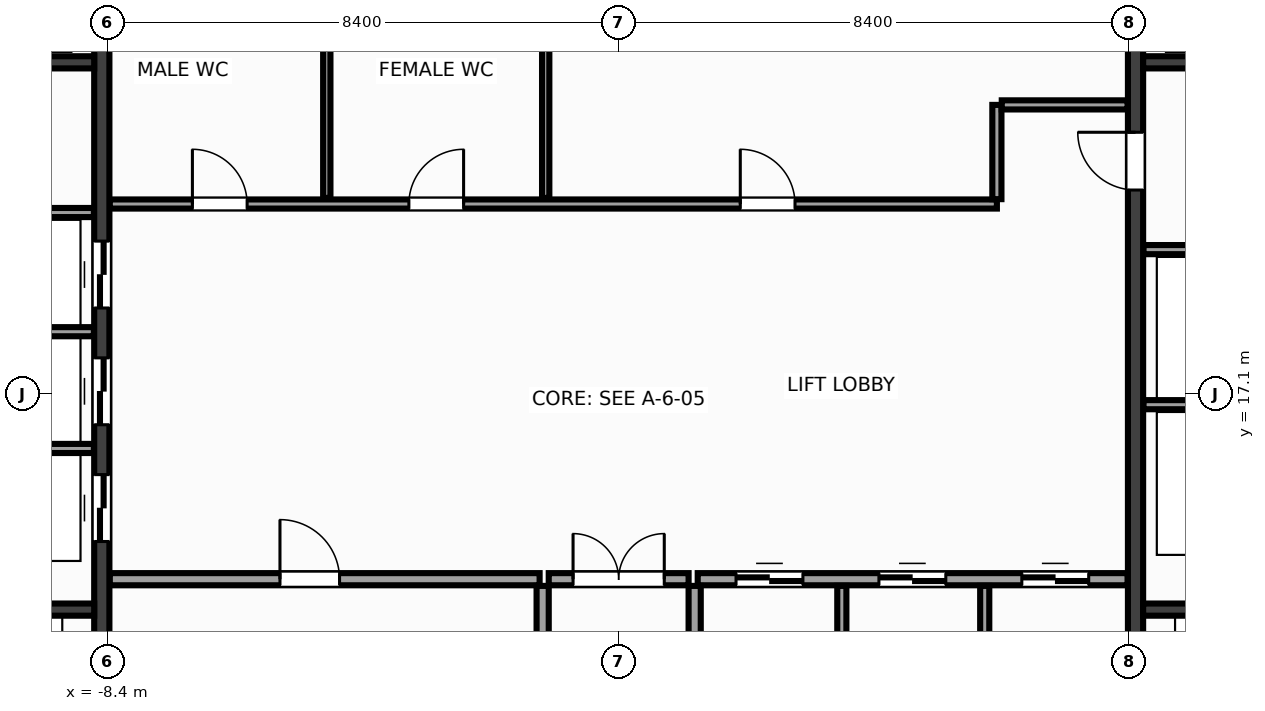
"""IFC4 building model, lengths in metres.
Left out: names, types, materials, properties, quantities, classifications, styles, units other than length and angle.
Written with IfcOpenShell. Run it as: python <this file> out.ifc"""

import sys

from ifc_helpers import new_model, si_unit, direction, frame, frame_2d, origin, place, context, subcontext, project, spatial, rectangle, extrude, source, transform, mapped, element, fill, save


model = new_model("IFC4")
c1 = context("Model", 3, precision=1e-05, world=origin(), true_north=direction((0.0, 1.0)))
c2 = subcontext(c1, "Body", "Model", "MODEL_VIEW")
j1 = project(units=[si_unit("LENGTHUNIT", "METRE"), si_unit("PLANEANGLEUNIT", "RADIAN")], contexts=[c1])
p1 = place(None, origin())
s1 = spatial("IfcSite", under=j1, at=p1, CompositionType="ELEMENT")
p2 = place(p1, origin())
s2 = spatial("IfcBuilding", under=s1, at=p2, CompositionType="ELEMENT")
p3 = place(p2, frame((0.0, 0.0, 153.2)))
s3 = spatial("IfcBuildingStorey", under=s2, at=p3, CompositionType="ELEMENT", Elevation=153.2)
m1 = source(origin(), c2, "Body", "SweptSolid", [
    extrude(rectangle(XDim=12.95, YDim=0.25, at=frame_2d((6.475, 0.0))), origin(), (0.0, 0.0, 1.0), 3.6),
])
p4 = place(p3, frame((-8.5, 10.525, 0.0), z_axis=(0.0, 0.0, 1.0), x_axis=(0.0, 1.0, 0.0)))
e1 = element("IfcWall", 1, at=p4, inside=s3, PredefinedType="SHEAR", context=c2, shape_type="MappedRepresentation", body=[
    mapped(m1, transform((0.0, 0.0, 0.0), x_axis=(1.0, 0.0, 0.0), y_axis=(0.0, 1.0, 0.0), z_axis=(0.0, 0.0, 1.0), scale=1.0)),
])
p5 = place(p4, frame((4.145, 0.0, 0.0)))
e2 = element("IfcOpeningElement", 2, at=p5, cuts=e1, PredefinedType="OPENING", context=c2, shape_type="SweptSolid", body=[
    extrude(rectangle(XDim=1.1, YDim=2.15, at=frame_2d((0.55, 1.075))), frame((0.0, 0.137, 0.0), z_axis=(0.0, -1.0, 0.0), x_axis=(1.0, 0.0, 0.0)), (0.0, 0.0, 1.0), 0.274),
])
p6 = place(p4, frame((6.065, 0.0, 0.0)))
e3 = element("IfcOpeningElement", 3, at=p6, cuts=e1, PredefinedType="OPENING", context=c2, shape_type="SweptSolid", body=[
    extrude(rectangle(XDim=1.1, YDim=2.15, at=frame_2d((0.55, 1.075))), frame((0.0, 0.137, 0.0), z_axis=(0.0, -1.0, 0.0), x_axis=(1.0, 0.0, 0.0)), (0.0, 0.0, 1.0), 0.274),
])
p7 = place(p4, frame((7.985, 0.0, 0.0)))
e4 = element("IfcOpeningElement", 4, at=p7, cuts=e1, PredefinedType="OPENING", context=c2, shape_type="SweptSolid", body=[
    extrude(rectangle(XDim=1.1, YDim=2.15, at=frame_2d((0.55, 1.075))), frame((0.0, 0.137, 0.0), z_axis=(0.0, -1.0, 0.0), x_axis=(1.0, 0.0, 0.0)), (0.0, 0.0, 1.0), 0.274),
])
p8 = place(p3, frame((8.5, 10.525, 0.0), z_axis=(0.0, 0.0, 1.0), x_axis=(0.0, 1.0, 0.0)))
e5 = element("IfcWall", 5, at=p8, inside=s3, PredefinedType="SHEAR", context=c2, shape_type="MappedRepresentation", body=[
    mapped(m1, transform((0.0, 0.0, 0.0), x_axis=(1.0, 0.0, 0.0), y_axis=(0.0, 1.0, 0.0), z_axis=(0.0, 0.0, 1.0), scale=1.0)),
])
p9 = place(p8, frame((9.925, 0.0, 0.0)))
e6 = element("IfcOpeningElement", 6, at=p9, cuts=e5, PredefinedType="OPENING", context=c2, shape_type="SweptSolid", body=[
    extrude(rectangle(XDim=0.95, YDim=2.15, at=frame_2d((0.475, 1.075))), frame((0.0, 0.137, 0.0), z_axis=(0.0, -1.0, 0.0), x_axis=(1.0, 0.0, 0.0)), (0.0, 0.0, 1.0), 0.274),
])
m2 = source(origin(), c2, "Body", "SweptSolid", [
    extrude(rectangle(XDim=2.825, YDim=0.2, at=frame_2d((1.413, 0.0))), origin(), (0.0, 0.0, 1.0), 3.6),
])
for number, where, z_axis, x_axis in (
    (7, (-11.45, 13.55, 0.0), (0.0, 0.0, 1.0), (1.0, 0.0, 0.0)),
    (8, (8.625, 13.55, 0.0), (0.0, 0.0, 1.0), (1.0, 0.0, 0.0)),
):
    element("IfcWall", number, at=place(p3, frame(where, z_axis=z_axis, x_axis=x_axis)), inside=s3, PredefinedType="SHEAR", context=c2, shape_type="MappedRepresentation", body=[
        mapped(m2, transform((0.0, 0.0, 0.0), x_axis=(1.0, 0.0, 0.0), y_axis=(0.0, 1.0, 0.0), z_axis=(0.0, 0.0, 1.0), scale=1.0)),
    ])
m3 = source(origin(), c2, "Body", "SweptSolid", [
    extrude(rectangle(XDim=3.02, YDim=0.2, at=frame_2d((1.51, 0.0))), origin(), (0.0, 0.0, 1.0), 3.6),
])
for number, where, z_axis, x_axis in (
    (9, (-11.645, 22.55, 0.0), (0.0, 0.0, 1.0), (1.0, 0.0, 0.0)),
    (10, (8.625, 22.55, 0.0), (0.0, 0.0, 1.0), (1.0, 0.0, 0.0)),
):
    element("IfcWall", number, at=place(p3, frame(where, z_axis=z_axis, x_axis=x_axis)), inside=s3, PredefinedType="SHEAR", context=c2, shape_type="MappedRepresentation", body=[
        mapped(m3, transform((0.0, 0.0, 0.0), x_axis=(1.0, 0.0, 0.0), y_axis=(0.0, 1.0, 0.0), z_axis=(0.0, 0.0, 1.0), scale=1.0)),
    ])
m4 = source(origin(), c2, "Body", "SweptSolid", [
    extrude(rectangle(XDim=3.01, YDim=0.15, at=frame_2d((1.505, 0.0))), origin(), (0.0, 0.0, 1.0), 3.38),
])
for number, where, z_axis, x_axis in (
    (11, (-11.64, 16.2, 0.0), (0.0, 0.0, 1.0), (1.0, 0.0, 0.0)),
    (12, (-11.64, 18.12, 0.0), (0.0, 0.0, 1.0), (1.0, 0.0, 0.0)),
    (13, (-11.64, 20.08, 0.0), (0.0, 0.0, 1.0), (1.0, 0.0, 0.0)),
    (14, (8.63, 16.92, 0.0), (0.0, 0.0, 1.0), (1.0, 0.0, 0.0)),
    (15, (8.63, 19.47, 0.0), (0.0, 0.0, 1.0), (1.0, 0.0, 0.0)),
):
    element("IfcWall", number, at=place(p3, frame(where, z_axis=z_axis, x_axis=x_axis)), inside=s3, PredefinedType="PARTITIONING", context=c2, shape_type="MappedRepresentation", body=[
        mapped(m4, transform((0.0, 0.0, 0.0), x_axis=(1.0, 0.0, 0.0), y_axis=(0.0, 1.0, 0.0), z_axis=(0.0, 0.0, 1.0), scale=1.0)),
    ])
m5 = source(origin(), c2, "Body", "SweptSolid", [
    extrude(rectangle(XDim=7.07, YDim=0.2, at=frame_2d((3.535, 0.0))), origin(), (0.0, 0.0, 1.0), 3.38),
])
p10 = place(p3, frame((-8.37, 14.05, 0.0), z_axis=(0.0, 0.0, 1.0), x_axis=(1.0, 0.0, 0.0)))
e16 = element("IfcWall", 16, at=p10, inside=s3, PredefinedType="PARTITIONING", context=c2, shape_type="MappedRepresentation", body=[
    mapped(m5, transform((0.0, 0.0, 0.0), x_axis=(1.0, 0.0, 0.0), y_axis=(0.0, 1.0, 0.0), z_axis=(0.0, 0.0, 1.0), scale=1.0)),
])
p11 = place(p10, frame((2.8, 0.0, 0.0)))
e17 = element("IfcOpeningElement", 17, at=p11, cuts=e16, PredefinedType="OPENING", context=c2, shape_type="SweptSolid", body=[
    extrude(rectangle(XDim=0.98, YDim=2.15, at=frame_2d((0.49, 1.075))), frame((0.0, 0.112, 0.0), z_axis=(0.0, -1.0, 0.0), x_axis=(1.0, 0.0, 0.0)), (0.0, 0.0, 1.0), 0.224),
])
p12 = place(p3, frame((1.3, 14.05, 0.0), z_axis=(0.0, 0.0, 1.0), x_axis=(1.0, 0.0, 0.0)))
e18 = element("IfcWall", 18, at=p12, inside=s3, PredefinedType="PARTITIONING", context=c2, shape_type="MappedRepresentation", body=[
    mapped(m5, transform((0.0, 0.0, 0.0), x_axis=(1.0, 0.0, 0.0), y_axis=(0.0, 1.0, 0.0), z_axis=(0.0, 0.0, 1.0), scale=1.0)),
])
p13 = place(p12, frame((0.63, 0.0, 0.0)))
e19 = element("IfcOpeningElement", 19, at=p13, cuts=e18, PredefinedType="OPENING", context=c2, shape_type="SweptSolid", body=[
    extrude(rectangle(XDim=1.1, YDim=2.15, at=frame_2d((0.55, 1.075))), frame((0.0, 0.112, 0.0), z_axis=(0.0, -1.0, 0.0), x_axis=(1.0, 0.0, 0.0)), (0.0, 0.0, 1.0), 0.224),
])
p14 = place(p12, frame((2.98, 0.0, 0.0)))
e20 = element("IfcOpeningElement", 20, at=p14, cuts=e18, PredefinedType="OPENING", context=c2, shape_type="SweptSolid", body=[
    extrude(rectangle(XDim=1.1, YDim=2.15, at=frame_2d((0.55, 1.075))), frame((0.0, 0.112, 0.0), z_axis=(0.0, -1.0, 0.0), x_axis=(1.0, 0.0, 0.0)), (0.0, 0.0, 1.0), 0.224),
])
p15 = place(p12, frame((5.33, 0.0, 0.0)))
e21 = element("IfcOpeningElement", 21, at=p15, cuts=e18, PredefinedType="OPENING", context=c2, shape_type="SweptSolid", body=[
    extrude(rectangle(XDim=1.1, YDim=2.15, at=frame_2d((0.55, 1.075))), frame((0.0, 0.112, 0.0), z_axis=(0.0, -1.0, 0.0), x_axis=(1.0, 0.0, 0.0)), (0.0, 0.0, 1.0), 0.224),
])
m6 = source(origin(), c2, "Body", "SweptSolid", [
    extrude(rectangle(XDim=3.415, YDim=0.2, at=frame_2d((1.708, 0.0))), origin(), (0.0, 0.0, 1.0), 3.38),
])
for number, where, z_axis, x_axis in (
    (22, (-1.25, 10.525, 0.0), (0.0, 0.0, 1.0), (0.0, 1.0, 0.0)),
    (23, (1.25, 10.525, 0.0), (0.0, 0.0, 1.0), (0.0, 1.0, 0.0)),
):
    element("IfcWall", number, at=place(p3, frame(where, z_axis=z_axis, x_axis=x_axis)), inside=s3, PredefinedType="PARTITIONING", context=c2, shape_type="MappedRepresentation", body=[
        mapped(m6, transform((0.0, 0.0, 0.0), x_axis=(1.0, 0.0, 0.0), y_axis=(0.0, 1.0, 0.0), z_axis=(0.0, 0.0, 1.0), scale=1.0)),
    ])
m7 = source(origin(), c2, "Body", "SweptSolid", [
    extrude(rectangle(XDim=2.3, YDim=0.2, at=frame_2d((1.15, 0.0))), origin(), (0.0, 0.0, 1.0), 3.38),
])
p16 = place(p3, frame((-1.15, 14.05, 0.0), z_axis=(0.0, 0.0, 1.0), x_axis=(1.0, 0.0, 0.0)))
e24 = element("IfcWall", 24, at=p16, inside=s3, PredefinedType="PARTITIONING", context=c2, shape_type="MappedRepresentation", body=[
    mapped(m7, transform((0.0, 0.0, 0.0), x_axis=(1.0, 0.0, 0.0), y_axis=(0.0, 1.0, 0.0), z_axis=(0.0, 0.0, 1.0), scale=1.0)),
])
p17 = place(p16, frame((0.4, 0.0, 0.0)))
e25 = element("IfcOpeningElement", 25, at=p17, cuts=e24, PredefinedType="OPENING", context=c2, shape_type="SweptSolid", body=[
    extrude(rectangle(XDim=1.5, YDim=2.2, at=frame_2d((0.75, 1.1))), frame((0.0, 0.112, 0.0), z_axis=(0.0, -1.0, 0.0), x_axis=(1.0, 0.0, 0.0)), (0.0, 0.0, 1.0), 0.224),
])
m8 = source(origin(), c2, "Body", "SweptSolid", [
    extrude(rectangle(XDim=14.59, YDim=0.15, at=frame_2d((7.295, 0.0))), origin(), (0.0, 0.0, 1.0), 3.38),
])
p18 = place(p3, frame((-8.37, 20.22, 0.0), z_axis=(0.0, 0.0, 1.0), x_axis=(1.0, 0.0, 0.0)))
e26 = element("IfcWall", 26, at=p18, inside=s3, PredefinedType="PARTITIONING", context=c2, shape_type="MappedRepresentation", body=[
    mapped(m8, transform((0.0, 0.0, 0.0), x_axis=(1.0, 0.0, 0.0), y_axis=(0.0, 1.0, 0.0), z_axis=(0.0, 0.0, 1.0), scale=1.0)),
])
p19 = place(p18, frame((1.36, 0.0, 0.0)))
e27 = element("IfcOpeningElement", 27, at=p19, cuts=e26, PredefinedType="OPENING", context=c2, shape_type="SweptSolid", body=[
    extrude(rectangle(XDim=0.9, YDim=2.15, at=frame_2d((0.45, 1.075))), frame((0.0, 0.087, 0.0), z_axis=(0.0, -1.0, 0.0), x_axis=(1.0, 0.0, 0.0)), (0.0, 0.0, 1.0), 0.174),
])
p20 = place(p18, frame((4.92, 0.0, 0.0)))
e28 = element("IfcOpeningElement", 28, at=p20, cuts=e26, PredefinedType="OPENING", context=c2, shape_type="SweptSolid", body=[
    extrude(rectangle(XDim=0.9, YDim=2.15, at=frame_2d((0.45, 1.075))), frame((0.0, 0.087, 0.0), z_axis=(0.0, -1.0, 0.0), x_axis=(1.0, 0.0, 0.0)), (0.0, 0.0, 1.0), 0.174),
])
p21 = place(p18, frame((10.37, 0.0, 0.0)))
e29 = element("IfcOpeningElement", 29, at=p21, cuts=e26, PredefinedType="OPENING", context=c2, shape_type="SweptSolid", body=[
    extrude(rectangle(XDim=0.9, YDim=2.15, at=frame_2d((0.45, 1.075))), frame((0.0, 0.087, 0.0), z_axis=(0.0, -1.0, 0.0), x_axis=(1.0, 0.0, 0.0)), (0.0, 0.0, 1.0), 0.174),
])
m9 = source(origin(), c2, "Body", "SweptSolid", [
    extrude(rectangle(XDim=1.55, YDim=0.15, at=frame_2d((0.775, 0.0))), origin(), (0.0, 0.0, 1.0), 3.38),
])
p22 = place(p3, frame((6.22, 20.3, 0.0), z_axis=(0.0, 0.0, 1.0), x_axis=(0.0, 1.0, 0.0)))
e30 = element("IfcWall", 30, at=p22, inside=s3, PredefinedType="PARTITIONING", context=c2, shape_type="MappedRepresentation", body=[
    mapped(m9, transform((0.0, 0.0, 0.0), x_axis=(1.0, 0.0, 0.0), y_axis=(0.0, 1.0, 0.0), z_axis=(0.0, 0.0, 1.0), scale=1.0)),
])
m10 = source(origin(), c2, "Body", "SweptSolid", [
    extrude(rectangle(XDim=2.07, YDim=0.15, at=frame_2d((1.035, 0.0))), origin(), (0.0, 0.0, 1.0), 3.38),
])
p23 = place(p3, frame((6.3, 21.85, 0.0), z_axis=(0.0, 0.0, 1.0), x_axis=(1.0, 0.0, 0.0)))
e31 = element("IfcWall", 31, at=p23, inside=s3, PredefinedType="PARTITIONING", context=c2, shape_type="MappedRepresentation", body=[
    mapped(m10, transform((0.0, 0.0, 0.0), x_axis=(1.0, 0.0, 0.0), y_axis=(0.0, 1.0, 0.0), z_axis=(0.0, 0.0, 1.0), scale=1.0)),
])
m11 = source(origin(), c2, "Body", "SweptSolid", [
    extrude(rectangle(XDim=3.415, YDim=0.15, at=frame_2d((1.708, 0.0))), origin(), (0.0, 0.0, 1.0), 3.38),
])
for number, where, z_axis, x_axis in (
    (32, (3.67, 10.525, 0.0), (0.0, 0.0, 1.0), (0.0, 1.0, 0.0)),
    (33, (6.02, 10.525, 0.0), (0.0, 0.0, 1.0), (0.0, 1.0, 0.0)),
):
    element("IfcWall", number, at=place(p3, frame(where, z_axis=z_axis, x_axis=x_axis)), inside=s3, PredefinedType="PARTITIONING", context=c2, shape_type="MappedRepresentation", body=[
        mapped(m11, transform((0.0, 0.0, 0.0), x_axis=(1.0, 0.0, 0.0), y_axis=(0.0, 1.0, 0.0), z_axis=(0.0, 0.0, 1.0), scale=1.0)),
    ])
m12 = source(origin(), c2, "Body", "SweptSolid", [
    extrude(rectangle(XDim=3.115, YDim=0.12, at=frame_2d((1.558, 0.0))), origin(), (0.0, 0.0, 1.0), 3.38),
])
for number, where, z_axis, x_axis in (
    (34, (-4.8, 20.32, 0.0), (0.0, 0.0, 1.0), (0.0, 1.0, 0.0)),
    (35, (-1.2, 20.32, 0.0), (0.0, 0.0, 1.0), (0.0, 1.0, 0.0)),
):
    element("IfcWall", number, at=place(p3, frame(where, z_axis=z_axis, x_axis=x_axis)), inside=s3, PredefinedType="PARTITIONING", context=c2, shape_type="MappedRepresentation", body=[
        mapped(m12, transform((0.0, 0.0, 0.0), x_axis=(1.0, 0.0, 0.0), y_axis=(0.0, 1.0, 0.0), z_axis=(0.0, 0.0, 1.0), scale=1.0)),
    ])
m13 = source(origin(), c2, "Body", "SweptSolid", [
    extrude(rectangle(XDim=1.1, YDim=2.15, at=frame_2d((0.55, 1.075))), frame((0.0, 0.025, 0.0), z_axis=(0.0, -1.0, 0.0), x_axis=(1.0, 0.0, 0.0)), (0.0, 0.0, 1.0), 0.05),
])
p24 = place(p5, origin())
e36 = element("IfcDoor", 36, at=p24, inside=s3, OperationType="DOUBLE_DOOR_SLIDING", PredefinedType="DOOR", context=c2, shape_type="MappedRepresentation", body=[
    mapped(m13, transform((0.0, 0.0, 0.0), x_axis=(1.0, 0.0, 0.0), y_axis=(0.0, 1.0, 0.0), z_axis=(0.0, 0.0, 1.0), scale=1.0)),
])
fill(e2, e36)
p25 = place(p6, origin())
e37 = element("IfcDoor", 37, at=p25, inside=s3, OperationType="DOUBLE_DOOR_SLIDING", PredefinedType="DOOR", context=c2, shape_type="MappedRepresentation", body=[
    mapped(m13, transform((0.0, 0.0, 0.0), x_axis=(1.0, 0.0, 0.0), y_axis=(0.0, 1.0, 0.0), z_axis=(0.0, 0.0, 1.0), scale=1.0)),
])
fill(e3, e37)
p26 = place(p7, origin())
e38 = element("IfcDoor", 38, at=p26, inside=s3, OperationType="DOUBLE_DOOR_SLIDING", PredefinedType="DOOR", context=c2, shape_type="MappedRepresentation", body=[
    mapped(m13, transform((0.0, 0.0, 0.0), x_axis=(1.0, 0.0, 0.0), y_axis=(0.0, 1.0, 0.0), z_axis=(0.0, 0.0, 1.0), scale=1.0)),
])
fill(e4, e38)
m14 = source(origin(), c2, "Body", "SweptSolid", [
    extrude(rectangle(XDim=0.95, YDim=2.15, at=frame_2d((0.475, 1.075))), frame((0.0, 0.025, 0.0), z_axis=(0.0, -1.0, 0.0), x_axis=(1.0, 0.0, 0.0)), (0.0, 0.0, 1.0), 0.05),
])
p27 = place(p9, origin())
e39 = element("IfcDoor", 39, at=p27, inside=s3, OperationType="SINGLE_SWING_RIGHT", PredefinedType="DOOR", context=c2, shape_type="MappedRepresentation", body=[
    mapped(m14, transform((0.0, 0.0, 0.0), x_axis=(1.0, 0.0, 0.0), y_axis=(0.0, 1.0, 0.0), z_axis=(0.0, 0.0, 1.0), scale=1.0)),
])
fill(e6, e39)
m15 = source(origin(), c2, "Body", "SweptSolid", [
    extrude(rectangle(XDim=0.98, YDim=2.15, at=frame_2d((0.49, 1.075))), frame((0.0, 0.025, 0.0), z_axis=(0.0, -1.0, 0.0), x_axis=(1.0, 0.0, 0.0)), (0.0, 0.0, 1.0), 0.05),
])
p28 = place(p11, origin())
e40 = element("IfcDoor", 40, at=p28, inside=s3, OperationType="SINGLE_SWING_LEFT", PredefinedType="DOOR", context=c2, shape_type="MappedRepresentation", body=[
    mapped(m15, transform((0.0, 0.0, 0.0), x_axis=(1.0, 0.0, 0.0), y_axis=(0.0, 1.0, 0.0), z_axis=(0.0, 0.0, 1.0), scale=1.0)),
])
fill(e17, e40)
p29 = place(p13, origin())
e41 = element("IfcDoor", 41, at=p29, inside=s3, OperationType="DOUBLE_DOOR_SLIDING", PredefinedType="DOOR", context=c2, shape_type="MappedRepresentation", body=[
    mapped(m13, transform((0.0, 0.0, 0.0), x_axis=(1.0, 0.0, 0.0), y_axis=(0.0, 1.0, 0.0), z_axis=(0.0, 0.0, 1.0), scale=1.0)),
])
fill(e19, e41)
p30 = place(p14, origin())
e42 = element("IfcDoor", 42, at=p30, inside=s3, OperationType="DOUBLE_DOOR_SLIDING", PredefinedType="DOOR", context=c2, shape_type="MappedRepresentation", body=[
    mapped(m13, transform((0.0, 0.0, 0.0), x_axis=(1.0, 0.0, 0.0), y_axis=(0.0, 1.0, 0.0), z_axis=(0.0, 0.0, 1.0), scale=1.0)),
])
fill(e20, e42)
p31 = place(p15, origin())
e43 = element("IfcDoor", 43, at=p31, inside=s3, OperationType="DOUBLE_DOOR_SLIDING", PredefinedType="DOOR", context=c2, shape_type="MappedRepresentation", body=[
    mapped(m13, transform((0.0, 0.0, 0.0), x_axis=(1.0, 0.0, 0.0), y_axis=(0.0, 1.0, 0.0), z_axis=(0.0, 0.0, 1.0), scale=1.0)),
])
fill(e21, e43)
m16 = source(origin(), c2, "Body", "SweptSolid", [
    extrude(rectangle(XDim=1.5, YDim=2.2, at=frame_2d((0.75, 1.1))), frame((0.0, 0.025, 0.0), z_axis=(0.0, -1.0, 0.0), x_axis=(1.0, 0.0, 0.0)), (0.0, 0.0, 1.0), 0.05),
])
p32 = place(p17, origin())
e44 = element("IfcDoor", 44, at=p32, inside=s3, OperationType="DOUBLE_DOOR_SINGLE_SWING", PredefinedType="DOOR", context=c2, shape_type="MappedRepresentation", body=[
    mapped(m16, transform((0.0, 0.0, 0.0), x_axis=(1.0, 0.0, 0.0), y_axis=(0.0, 1.0, 0.0), z_axis=(0.0, 0.0, 1.0), scale=1.0)),
])
fill(e25, e44)
m17 = source(origin(), c2, "Body", "SweptSolid", [
    extrude(rectangle(XDim=0.9, YDim=2.15, at=frame_2d((0.45, 1.075))), frame((0.0, 0.025, 0.0), z_axis=(0.0, -1.0, 0.0), x_axis=(1.0, 0.0, 0.0)), (0.0, 0.0, 1.0), 0.05),
])
p33 = place(p19, origin())
e45 = element("IfcDoor", 45, at=p33, inside=s3, OperationType="SINGLE_SWING_LEFT", PredefinedType="DOOR", context=c2, shape_type="MappedRepresentation", body=[
    mapped(m17, transform((0.0, 0.0, 0.0), x_axis=(1.0, 0.0, 0.0), y_axis=(0.0, 1.0, 0.0), z_axis=(0.0, 0.0, 1.0), scale=1.0)),
])
fill(e27, e45)
p34 = place(p20, origin())
e46 = element("IfcDoor", 46, at=p34, inside=s3, OperationType="SINGLE_SWING_RIGHT", PredefinedType="DOOR", context=c2, shape_type="MappedRepresentation", body=[
    mapped(m17, transform((0.0, 0.0, 0.0), x_axis=(1.0, 0.0, 0.0), y_axis=(0.0, 1.0, 0.0), z_axis=(0.0, 0.0, 1.0), scale=1.0)),
])
fill(e28, e46)
p35 = place(p21, origin())
e47 = element("IfcDoor", 47, at=p35, inside=s3, OperationType="SINGLE_SWING_LEFT", PredefinedType="DOOR", context=c2, shape_type="MappedRepresentation", body=[
    mapped(m17, transform((0.0, 0.0, 0.0), x_axis=(1.0, 0.0, 0.0), y_axis=(0.0, 1.0, 0.0), z_axis=(0.0, 0.0, 1.0), scale=1.0)),
])
fill(e29, e47)
save(model, sys.argv[1])
